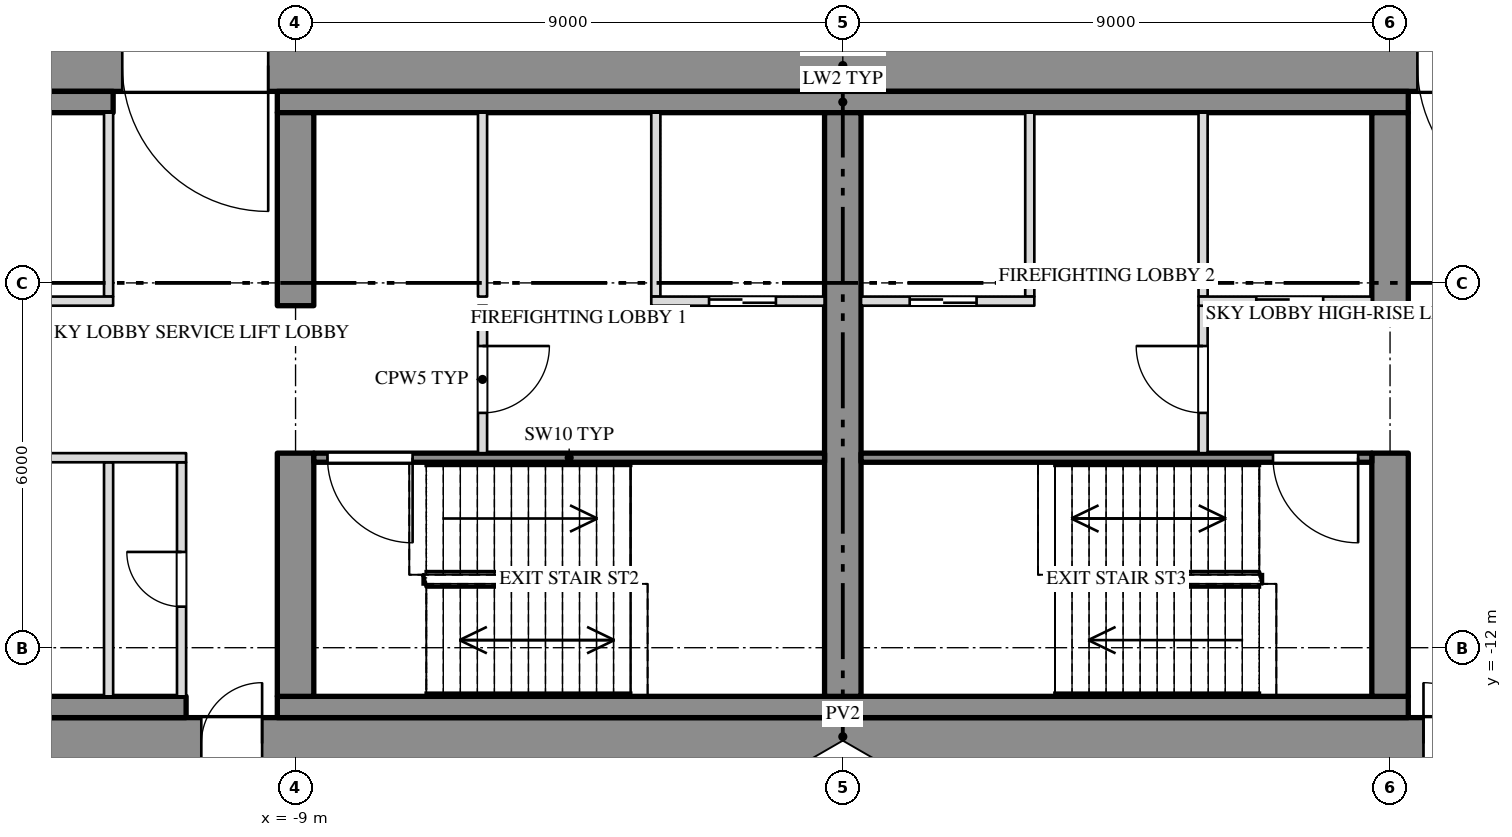
"""IFC4 building model, lengths in metres.
Left out: names, types, materials, properties, quantities, classifications, styles, units other than length and angle.
Written with IfcOpenShell. Run it as: python <this file> out.ifc"""

import sys

from ifc_helpers import new_model, si_unit, direction, frame, frame_2d, origin, place, context, subcontext, project, spatial, rectangle, extrude, element, fill, save


model = new_model("IFC4")
c1 = context("Model", 3, precision=1e-05, world=origin(), true_north=direction((0.0, 1.0)))
c2 = subcontext(c1, "Body", "Model", "MODEL_VIEW")
j1 = project(units=[si_unit("LENGTHUNIT", "METRE"), si_unit("PLANEANGLEUNIT", "RADIAN")], contexts=[c1])
p1 = place(None, origin())
s1 = spatial("IfcSite", under=j1, at=p1, CompositionType="ELEMENT")
p2 = place(p1, origin())
s2 = spatial("IfcBuilding", under=s1, at=p2, CompositionType="ELEMENT")
p3 = place(p2, frame((0.0, 0.0, 212.5)))
s3 = spatial("IfcBuildingStorey", under=s2, at=p3, CompositionType="ELEMENT", Elevation=212.5)
p4 = place(p3, frame((-27.0, -2.425, 0.0), z_axis=(0.0, 0.0, 1.0), x_axis=(1.0, 0.0, 0.0)))
e1 = element("IfcWall", 1, at=p4, inside=s3, PredefinedType="SHEAR", context=c2, shape_type="SweptSolid", body=[
    extrude(rectangle(XDim=54.0, YDim=0.85, at=frame_2d((27.0, 0.0))), origin(), (0.0, 0.0, 1.0), 3.65),
])
p5 = place(p4, frame((15.15, 0.0, 0.0)))
e2 = element("IfcOpeningElement", 2, at=p5, cuts=e1, PredefinedType="OPENING", context=c2, shape_type="SweptSolid", body=[
    extrude(rectangle(XDim=2.4, YDim=2.1, at=frame_2d((1.2, 1.05))), frame((0.0, 0.437, 0.0), z_axis=(0.0, -1.0, 0.0), x_axis=(1.0, 0.0, 0.0)), (0.0, 0.0, 1.0), 0.874),
])
p6 = place(p4, frame((36.45, 0.0, 0.0)))
e3 = element("IfcOpeningElement", 3, at=p6, cuts=e1, PredefinedType="OPENING", context=c2, shape_type="SweptSolid", body=[
    extrude(rectangle(XDim=2.4, YDim=2.1, at=frame_2d((1.2, 1.05))), frame((0.0, 0.437, 0.0), z_axis=(0.0, -1.0, 0.0), x_axis=(1.0, 0.0, 0.0)), (0.0, 0.0, 1.0), 0.874),
])
p7 = place(p3, frame((-27.0, -13.575, 0.0), z_axis=(0.0, 0.0, 1.0), x_axis=(1.0, 0.0, 0.0)))
e4 = element("IfcWall", 4, at=p7, inside=s3, PredefinedType="SHEAR", context=c2, shape_type="SweptSolid", body=[
    extrude(rectangle(XDim=54.0, YDim=0.85, at=frame_2d((27.0, 0.0))), origin(), (0.0, 0.0, 1.0), 3.65),
])
p8 = place(p7, frame((16.45, 0.0, 0.0)))
e5 = element("IfcOpeningElement", 5, at=p8, cuts=e4, PredefinedType="OPENING", context=c2, shape_type="SweptSolid", body=[
    extrude(rectangle(XDim=1.0, YDim=2.1, at=frame_2d((0.5, 1.05))), frame((0.0, 0.437, 0.0), z_axis=(0.0, -1.0, 0.0), x_axis=(1.0, 0.0, 0.0)), (0.0, 0.0, 1.0), 0.874),
])
p9 = place(p7, frame((36.55, 0.0, 0.0)))
e6 = element("IfcOpeningElement", 6, at=p9, cuts=e4, PredefinedType="OPENING", context=c2, shape_type="SweptSolid", body=[
    extrude(rectangle(XDim=1.0, YDim=2.1, at=frame_2d((0.5, 1.05))), frame((0.0, 0.437, 0.0), z_axis=(0.0, -1.0, 0.0), x_axis=(1.0, 0.0, 0.0)), (0.0, 0.0, 1.0), 0.874),
])
p10 = place(p3, frame((-26.15, -3.025, 0.0), z_axis=(0.0, 0.0, 1.0), x_axis=(1.0, 0.0, 0.0)))
e7 = element("IfcWall", 7, at=p10, inside=s3, PredefinedType="SHEAR", context=c2, shape_type="SweptSolid", body=[
    extrude(rectangle(XDim=14.15, YDim=0.35, at=frame_2d((7.075, 0.0))), origin(), (0.0, 0.0, 1.0), 3.65),
])
p11 = place(p3, frame((-9.3, -3.025, 0.0), z_axis=(0.0, 0.0, 1.0), x_axis=(1.0, 0.0, 0.0)))
e8 = element("IfcWall", 8, at=p11, inside=s3, PredefinedType="SHEAR", context=c2, shape_type="SweptSolid", body=[
    extrude(rectangle(XDim=18.6, YDim=0.35, at=frame_2d((9.3, 0.0))), origin(), (0.0, 0.0, 1.0), 3.65),
])
p12 = place(p3, frame((-26.15, -12.975, 0.0), z_axis=(0.0, 0.0, 1.0), x_axis=(1.0, 0.0, 0.0)))
e9 = element("IfcWall", 9, at=p12, inside=s3, PredefinedType="SHEAR", context=c2, shape_type="SweptSolid", body=[
    extrude(rectangle(XDim=15.35, YDim=0.35, at=frame_2d((7.675, 0.0))), origin(), (0.0, 0.0, 1.0), 3.65),
])
p13 = place(p3, frame((-9.3, -12.975, 0.0), z_axis=(0.0, 0.0, 1.0), x_axis=(1.0, 0.0, 0.0)))
e10 = element("IfcWall", 10, at=p13, inside=s3, PredefinedType="SHEAR", context=c2, shape_type="SweptSolid", body=[
    extrude(rectangle(XDim=18.6, YDim=0.35, at=frame_2d((9.3, 0.0))), origin(), (0.0, 0.0, 1.0), 3.65),
])
p14 = place(p3, frame((-9.0, -12.8, 0.0), z_axis=(0.0, 0.0, 1.0), x_axis=(0.0, 1.0, 0.0)))
e11 = element("IfcWall", 11, at=p14, inside=s3, PredefinedType="SHEAR", context=c2, shape_type="SweptSolid", body=[
    extrude(rectangle(XDim=4.0, YDim=0.6, at=frame_2d((2.0, 0.0))), origin(), (0.0, 0.0, 1.0), 3.65),
])
p15 = place(p3, frame((-9.0, -6.375, 0.0), z_axis=(0.0, 0.0, 1.0), x_axis=(0.0, 1.0, 0.0)))
e12 = element("IfcWall", 12, at=p15, inside=s3, PredefinedType="SHEAR", context=c2, shape_type="SweptSolid", body=[
    extrude(rectangle(XDim=3.175, YDim=0.6, at=frame_2d((1.587, 0.0))), origin(), (0.0, 0.0, 1.0), 3.65),
])
p16 = place(p3, frame((0.0, -12.8, 0.0), z_axis=(0.0, 0.0, 1.0), x_axis=(0.0, 1.0, 0.0)))
e13 = element("IfcWall", 13, at=p16, inside=s3, PredefinedType="SHEAR", context=c2, shape_type="SweptSolid", body=[
    extrude(rectangle(XDim=9.6, YDim=0.6, at=frame_2d((4.8, 0.0))), origin(), (0.0, 0.0, 1.0), 3.65),
])
p17 = place(p3, frame((9.0, -12.8, 0.0), z_axis=(0.0, 0.0, 1.0), x_axis=(0.0, 1.0, 0.0)))
e14 = element("IfcWall", 14, at=p17, inside=s3, PredefinedType="SHEAR", context=c2, shape_type="SweptSolid", body=[
    extrude(rectangle(XDim=4.0, YDim=0.6, at=frame_2d((2.0, 0.0))), origin(), (0.0, 0.0, 1.0), 3.65),
])
p18 = place(p3, frame((9.0, -6.375, 0.0), z_axis=(0.0, 0.0, 1.0), x_axis=(0.0, 1.0, 0.0)))
e15 = element("IfcWall", 15, at=p18, inside=s3, PredefinedType="SHEAR", context=c2, shape_type="SweptSolid", body=[
    extrude(rectangle(XDim=3.175, YDim=0.6, at=frame_2d((1.587, 0.0))), origin(), (0.0, 0.0, 1.0), 3.65),
])
for number, where, z_axis, x_axis in (
    (16, (-12.075, -6.225, 0.0), (0.0, 0.0, 1.0), (0.0, 1.0, 0.0)),
    (17, (-3.075, -6.225, 0.0), (0.0, 0.0, 1.0), (0.0, 1.0, 0.0)),
    (18, (-5.925, -6.225, 0.0), (0.0, 0.0, 1.0), (0.0, 1.0, 0.0)),
    (19, (3.075, -6.225, 0.0), (0.0, 0.0, 1.0), (0.0, 1.0, 0.0)),
    (20, (5.925, -6.225, 0.0), (0.0, 0.0, 1.0), (0.0, 1.0, 0.0)),
):
    element("IfcWall", number, at=place(p3, frame(where, z_axis=z_axis, x_axis=x_axis)), inside=s3, PredefinedType="PARTITIONING", context=c2, shape_type="SweptSolid", body=[
        extrude(rectangle(XDim=3.025, YDim=0.15, at=frame_2d((1.513, 0.0))), origin(), (0.0, 0.0, 1.0), 3.65),
    ])
p19 = place(p3, frame((-10.875, -12.8, 0.0), z_axis=(0.0, 0.0, 1.0), x_axis=(0.0, 1.0, 0.0)))
e21 = element("IfcWall", 21, at=p19, inside=s3, PredefinedType="PARTITIONING", context=c2, shape_type="SweptSolid", body=[
    extrude(rectangle(XDim=3.85, YDim=0.15, at=frame_2d((1.925, 0.0))), origin(), (0.0, 0.0, 1.0), 3.65),
])
p20 = place(p19, frame((1.475, 0.0, 0.0)))
e22 = element("IfcOpeningElement", 22, at=p20, cuts=e21, PredefinedType="OPENING", context=c2, shape_type="SweptSolid", body=[
    extrude(rectangle(XDim=0.9, YDim=2.1, at=frame_2d((0.45, 1.05))), frame((0.0, 0.087, 0.0), z_axis=(0.0, -1.0, 0.0), x_axis=(1.0, 0.0, 0.0)), (0.0, 0.0, 1.0), 0.174),
])
p21 = place(p3, frame((-12.075, -12.8, 0.0), z_axis=(0.0, 0.0, 1.0), x_axis=(0.0, 1.0, 0.0)))
e23 = element("IfcWall", 23, at=p21, inside=s3, PredefinedType="PARTITIONING", context=c2, shape_type="SweptSolid", body=[
    extrude(rectangle(XDim=3.85, YDim=0.15, at=frame_2d((1.925, 0.0))), origin(), (0.0, 0.0, 1.0), 3.65),
])
p22 = place(p3, frame((-5.925, -8.8, 0.0), z_axis=(0.0, 0.0, 1.0), x_axis=(0.0, 1.0, 0.0)))
e24 = element("IfcWall", 24, at=p22, inside=s3, PredefinedType="PARTITIONING", context=c2, shape_type="SweptSolid", body=[
    extrude(rectangle(XDim=2.425, YDim=0.15, at=frame_2d((1.212, 0.0))), origin(), (0.0, 0.0, 1.0), 3.65),
])
p23 = place(p22, frame((0.662, 0.0, 0.0)))
e25 = element("IfcOpeningElement", 25, at=p23, cuts=e24, PredefinedType="OPENING", context=c2, shape_type="SweptSolid", body=[
    extrude(rectangle(XDim=1.1, YDim=2.1, at=frame_2d((0.55, 1.05))), frame((0.0, 0.087, 0.0), z_axis=(0.0, -1.0, 0.0), x_axis=(1.0, 0.0, 0.0)), (0.0, 0.0, 1.0), 0.174),
])
p24 = place(p3, frame((5.925, -8.8, 0.0), z_axis=(0.0, 0.0, 1.0), x_axis=(0.0, 1.0, 0.0)))
e26 = element("IfcWall", 26, at=p24, inside=s3, PredefinedType="PARTITIONING", context=c2, shape_type="SweptSolid", body=[
    extrude(rectangle(XDim=2.425, YDim=0.15, at=frame_2d((1.212, 0.0))), origin(), (0.0, 0.0, 1.0), 3.65),
])
p25 = place(p24, frame((0.662, 0.0, 0.0)))
e27 = element("IfcOpeningElement", 27, at=p25, cuts=e26, PredefinedType="OPENING", context=c2, shape_type="SweptSolid", body=[
    extrude(rectangle(XDim=1.1, YDim=2.1, at=frame_2d((0.55, 1.05))), frame((0.0, 0.087, 0.0), z_axis=(0.0, -1.0, 0.0), x_axis=(1.0, 0.0, 0.0)), (0.0, 0.0, 1.0), 0.174),
])
p26 = place(p3, frame((-17.7, -6.3, 0.0), z_axis=(0.0, 0.0, 1.0), x_axis=(1.0, 0.0, 0.0)))
e28 = element("IfcWall", 28, at=p26, inside=s3, PredefinedType="PARTITIONING", context=c2, shape_type="SweptSolid", body=[
    extrude(rectangle(XDim=5.7, YDim=0.15, at=frame_2d((2.85, 0.0))), origin(), (0.0, 0.0, 1.0), 3.65),
])
p27 = place(p26, frame((2.275, 0.0, 0.0)))
e29 = element("IfcOpeningElement", 29, at=p27, cuts=e28, PredefinedType="OPENING", context=c2, shape_type="SweptSolid", body=[
    extrude(rectangle(XDim=1.0, YDim=2.1, at=frame_2d((0.5, 1.05))), frame((0.0, 0.087, 0.0), z_axis=(0.0, -1.0, 0.0), x_axis=(1.0, 0.0, 0.0)), (0.0, 0.0, 1.0), 0.174),
])
p28 = place(p3, frame((-3.15, -6.3, 0.0), z_axis=(0.0, 0.0, 1.0), x_axis=(1.0, 0.0, 0.0)))
e30 = element("IfcWall", 30, at=p28, inside=s3, PredefinedType="PARTITIONING", context=c2, shape_type="SweptSolid", body=[
    extrude(rectangle(XDim=2.85, YDim=0.15, at=frame_2d((1.425, 0.0))), origin(), (0.0, 0.0, 1.0), 3.65),
])
p29 = place(p28, frame((0.95, 0.0, 0.0)))
e31 = element("IfcOpeningElement", 31, at=p29, cuts=e30, PredefinedType="OPENING", context=c2, shape_type="SweptSolid", body=[
    extrude(rectangle(XDim=1.1, YDim=2.1, at=frame_2d((0.55, 1.05))), frame((0.0, 0.087, 0.0), z_axis=(0.0, -1.0, 0.0), x_axis=(1.0, 0.0, 0.0)), (0.0, 0.0, 1.0), 0.174),
])
p30 = place(p3, frame((0.3, -6.3, 0.0), z_axis=(0.0, 0.0, 1.0), x_axis=(1.0, 0.0, 0.0)))
e32 = element("IfcWall", 32, at=p30, inside=s3, PredefinedType="PARTITIONING", context=c2, shape_type="SweptSolid", body=[
    extrude(rectangle(XDim=2.85, YDim=0.15, at=frame_2d((1.425, 0.0))), origin(), (0.0, 0.0, 1.0), 3.65),
])
p31 = place(p30, frame((0.8, 0.0, 0.0)))
e33 = element("IfcOpeningElement", 33, at=p31, cuts=e32, PredefinedType="OPENING", context=c2, shape_type="SweptSolid", body=[
    extrude(rectangle(XDim=1.1, YDim=2.1, at=frame_2d((0.55, 1.05))), frame((0.0, 0.087, 0.0), z_axis=(0.0, -1.0, 0.0), x_axis=(1.0, 0.0, 0.0)), (0.0, 0.0, 1.0), 0.174),
])
p32 = place(p3, frame((5.85, -6.3, 0.0), z_axis=(0.0, 0.0, 1.0), x_axis=(1.0, 0.0, 0.0)))
e34 = element("IfcWall", 34, at=p32, inside=s3, PredefinedType="PARTITIONING", context=c2, shape_type="SweptSolid", body=[
    extrude(rectangle(XDim=2.85, YDim=0.15, at=frame_2d((1.425, 0.0))), origin(), (0.0, 0.0, 1.0), 3.65),
])
p33 = place(p32, frame((0.95, 0.0, 0.0)))
e35 = element("IfcOpeningElement", 35, at=p33, cuts=e34, PredefinedType="OPENING", context=c2, shape_type="SweptSolid", body=[
    extrude(rectangle(XDim=1.1, YDim=2.1, at=frame_2d((0.55, 1.05))), frame((0.0, 0.087, 0.0), z_axis=(0.0, -1.0, 0.0), x_axis=(1.0, 0.0, 0.0)), (0.0, 0.0, 1.0), 0.174),
])
p34 = place(p3, frame((-17.7, -8.875, 0.0), z_axis=(0.0, 0.0, 1.0), x_axis=(1.0, 0.0, 0.0)))
e36 = element("IfcWall", 36, at=p34, inside=s3, PredefinedType="PARTITIONING", context=c2, shape_type="SweptSolid", body=[
    extrude(rectangle(XDim=6.9, YDim=0.15, at=frame_2d((3.45, 0.0))), origin(), (0.0, 0.0, 1.0), 3.65),
])
p35 = place(p34, frame((2.275, 0.0, 0.0)))
e37 = element("IfcOpeningElement", 37, at=p35, cuts=e36, PredefinedType="OPENING", context=c2, shape_type="SweptSolid", body=[
    extrude(rectangle(XDim=1.0, YDim=2.1, at=frame_2d((0.5, 1.05))), frame((0.0, 0.087, 0.0), z_axis=(0.0, -1.0, 0.0), x_axis=(1.0, 0.0, 0.0)), (0.0, 0.0, 1.0), 0.174),
])
p36 = place(p3, frame((-8.7, -8.875, 0.0), z_axis=(0.0, 0.0, 1.0), x_axis=(1.0, 0.0, 0.0)))
e38 = element("IfcWall", 38, at=p36, inside=s3, PredefinedType="SHEAR", context=c2, shape_type="SweptSolid", body=[
    extrude(rectangle(XDim=8.4, YDim=0.15, at=frame_2d((4.2, 0.0))), origin(), (0.0, 0.0, 1.0), 3.65),
])
p37 = place(p36, frame((0.225, 0.0, 0.0)))
e39 = element("IfcOpeningElement", 39, at=p37, cuts=e38, PredefinedType="OPENING", context=c2, shape_type="SweptSolid", body=[
    extrude(rectangle(XDim=1.4, YDim=2.1, at=frame_2d((0.7, 1.05))), frame((0.0, 0.087, 0.0), z_axis=(0.0, -1.0, 0.0), x_axis=(1.0, 0.0, 0.0)), (0.0, 0.0, 1.0), 0.174),
])
p38 = place(p3, frame((0.3, -8.875, 0.0), z_axis=(0.0, 0.0, 1.0), x_axis=(1.0, 0.0, 0.0)))
e40 = element("IfcWall", 40, at=p38, inside=s3, PredefinedType="SHEAR", context=c2, shape_type="SweptSolid", body=[
    extrude(rectangle(XDim=8.4, YDim=0.15, at=frame_2d((4.2, 0.0))), origin(), (0.0, 0.0, 1.0), 3.65),
])
p39 = place(p38, frame((6.775, 0.0, 0.0)))
e41 = element("IfcOpeningElement", 41, at=p39, cuts=e40, PredefinedType="OPENING", context=c2, shape_type="SweptSolid", body=[
    extrude(rectangle(XDim=1.4, YDim=2.1, at=frame_2d((0.7, 1.05))), frame((0.0, 0.087, 0.0), z_axis=(0.0, -1.0, 0.0), x_axis=(1.0, 0.0, 0.0)), (0.0, 0.0, 1.0), 0.174),
])
p40 = place(p20, origin())
e42 = element("IfcDoor", 42, at=p40, inside=s3, OperationType="SINGLE_SWING_RIGHT", PredefinedType="DOOR", context=c2, shape_type="SweptSolid", body=[
    extrude(rectangle(XDim=0.9, YDim=2.1, at=frame_2d((0.45, 1.05))), frame((0.0, 0.025, 0.0), z_axis=(0.0, -1.0, 0.0), x_axis=(1.0, 0.0, 0.0)), (0.0, 0.0, 1.0), 0.05),
])
fill(e22, e42)
p41 = place(p5, origin())
e43 = element("IfcDoor", 43, at=p41, inside=s3, OperationType="DOUBLE_DOOR_SINGLE_SWING", PredefinedType="DOOR", context=c2, shape_type="SweptSolid", body=[
    extrude(rectangle(XDim=2.4, YDim=2.1, at=frame_2d((1.2, 1.05))), frame((0.0, 0.025, 0.0), z_axis=(0.0, -1.0, 0.0), x_axis=(1.0, 0.0, 0.0)), (0.0, 0.0, 1.0), 0.05),
])
fill(e2, e43)
p42 = place(p8, origin())
e44 = element("IfcDoor", 44, at=p42, inside=s3, OperationType="SINGLE_SWING_RIGHT", PredefinedType="DOOR", context=c2, shape_type="SweptSolid", body=[
    extrude(rectangle(XDim=1.0, YDim=2.1, at=frame_2d((0.5, 1.05))), frame((0.0, 0.025, 0.0), z_axis=(0.0, -1.0, 0.0), x_axis=(1.0, 0.0, 0.0)), (0.0, 0.0, 1.0), 0.05),
])
fill(e5, e44)
p43 = place(p37, origin())
e45 = element("IfcDoor", 45, at=p43, inside=s3, OperationType="DOUBLE_DOOR_SINGLE_SWING", PredefinedType="DOOR", context=c2, shape_type="SweptSolid", body=[
    extrude(rectangle(XDim=1.4, YDim=2.1, at=frame_2d((0.7, 1.05))), frame((0.0, 0.025, 0.0), z_axis=(0.0, -1.0, 0.0), x_axis=(1.0, 0.0, 0.0)), (0.0, 0.0, 1.0), 0.05),
])
fill(e39, e45)
p44 = place(p23, origin())
e46 = element("IfcDoor", 46, at=p44, inside=s3, OperationType="SINGLE_SWING_LEFT", PredefinedType="DOOR", context=c2, shape_type="SweptSolid", body=[
    extrude(rectangle(XDim=1.1, YDim=2.1, at=frame_2d((0.55, 1.05))), frame((0.0, 0.025, 0.0), z_axis=(0.0, -1.0, 0.0), x_axis=(1.0, 0.0, 0.0)), (0.0, 0.0, 1.0), 0.05),
])
fill(e25, e46)
p45 = place(p29, origin())
e47 = element("IfcDoor", 47, at=p45, inside=s3, OperationType="SLIDING_TO_RIGHT", PredefinedType="DOOR", context=c2, shape_type="SweptSolid", body=[
    extrude(rectangle(XDim=1.1, YDim=2.1, at=frame_2d((0.55, 1.05))), frame((0.0, 0.025, 0.0), z_axis=(0.0, -1.0, 0.0), x_axis=(1.0, 0.0, 0.0)), (0.0, 0.0, 1.0), 0.05),
])
fill(e31, e47)
p46 = place(p31, origin())
e48 = element("IfcDoor", 48, at=p46, inside=s3, OperationType="SLIDING_TO_LEFT", PredefinedType="DOOR", context=c2, shape_type="SweptSolid", body=[
    extrude(rectangle(XDim=1.1, YDim=2.1, at=frame_2d((0.55, 1.05))), frame((0.0, 0.025, 0.0), z_axis=(0.0, -1.0, 0.0), x_axis=(1.0, 0.0, 0.0)), (0.0, 0.0, 1.0), 0.05),
])
fill(e33, e48)
p47 = place(p25, origin())
e49 = element("IfcDoor", 49, at=p47, inside=s3, OperationType="SINGLE_SWING_RIGHT", PredefinedType="DOOR", context=c2, shape_type="SweptSolid", body=[
    extrude(rectangle(XDim=1.1, YDim=2.1, at=frame_2d((0.55, 1.05))), frame((0.0, 0.025, 0.0), z_axis=(0.0, -1.0, 0.0), x_axis=(1.0, 0.0, 0.0)), (0.0, 0.0, 1.0), 0.05),
])
fill(e27, e49)
p48 = place(p33, origin())
e50 = element("IfcDoor", 50, at=p48, inside=s3, OperationType="SLIDING_TO_LEFT", PredefinedType="DOOR", context=c2, shape_type="SweptSolid", body=[
    extrude(rectangle(XDim=1.1, YDim=2.1, at=frame_2d((0.55, 1.05))), frame((0.0, 0.025, 0.0), z_axis=(0.0, -1.0, 0.0), x_axis=(1.0, 0.0, 0.0)), (0.0, 0.0, 1.0), 0.05),
])
fill(e35, e50)
p49 = place(p39, origin())
e51 = element("IfcDoor", 51, at=p49, inside=s3, OperationType="DOUBLE_DOOR_SINGLE_SWING", PredefinedType="DOOR", context=c2, shape_type="SweptSolid", body=[
    extrude(rectangle(XDim=1.4, YDim=2.1, at=frame_2d((0.7, 1.05))), frame((0.0, 0.025, 0.0), z_axis=(0.0, -1.0, 0.0), x_axis=(1.0, 0.0, 0.0)), (0.0, 0.0, 1.0), 0.05),
])
fill(e41, e51)
p50 = place(p9, origin())
e52 = element("IfcDoor", 52, at=p50, inside=s3, OperationType="SINGLE_SWING_LEFT", PredefinedType="DOOR", context=c2, shape_type="SweptSolid", body=[
    extrude(rectangle(XDim=1.0, YDim=2.1, at=frame_2d((0.5, 1.05))), frame((0.0, 0.025, 0.0), z_axis=(0.0, -1.0, 0.0), x_axis=(1.0, 0.0, 0.0)), (0.0, 0.0, 1.0), 0.05),
])
fill(e6, e52)
p51 = place(p6, origin())
e53 = element("IfcDoor", 53, at=p51, inside=s3, OperationType="DOUBLE_DOOR_SINGLE_SWING", PredefinedType="DOOR", context=c2, shape_type="SweptSolid", body=[
    extrude(rectangle(XDim=2.4, YDim=2.1, at=frame_2d((1.2, 1.05))), frame((0.0, 0.025, 0.0), z_axis=(0.0, -1.0, 0.0), x_axis=(1.0, 0.0, 0.0)), (0.0, 0.0, 1.0), 0.05),
])
fill(e3, e53)
save(model, sys.argv[1])
